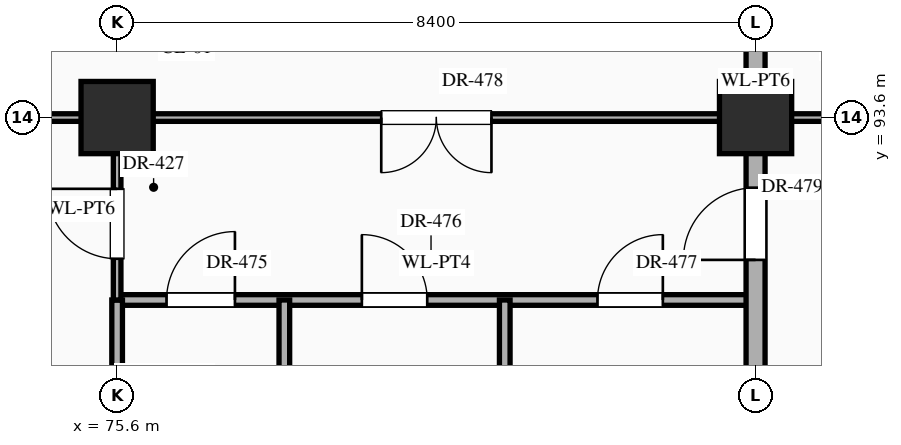
"""IFC4 building model, lengths in metres.
Left out: names, types, materials, properties, quantities, classifications, styles, units other than length and angle.
Written with IfcOpenShell. Run it as: python <this file> out.ifc"""

import sys

from ifc_helpers import new_model, si_unit, direction, frame, frame_2d, origin, origin_2d, place, context, subcontext, project, spatial, rectangle, extrude, element, fill, save


model = new_model("IFC4")
c1 = context("Model", 3, precision=1e-05, world=origin(), true_north=direction((0.0, 1.0)))
c2 = subcontext(c1, "Body", "Model", "MODEL_VIEW")
j1 = project(units=[si_unit("LENGTHUNIT", "METRE"), si_unit("PLANEANGLEUNIT", "RADIAN")], contexts=[c1])
p1 = place(None, origin())
s1 = spatial("IfcSite", under=j1, at=p1, CompositionType="ELEMENT")
p2 = place(p1, origin())
s2 = spatial("IfcBuilding", under=s1, at=p2, CompositionType="ELEMENT")
p3 = place(p2, frame((0.0, 0.0, -5.4)))
s3 = spatial("IfcBuildingStorey", under=s2, at=p3, CompositionType="ELEMENT", Elevation=-5.4)
for number, where, z_axis, x_axis in (
    (1, (75.6, 93.6, 0.0), (0.0, 0.0, 1.0), (1.0, 0.0, 0.0)),
    (2, (84.0, 93.6, 0.0), (0.0, 0.0, 1.0), (1.0, 0.0, 0.0)),
):
    element("IfcColumn", number, at=place(p3, frame(where, z_axis=z_axis, x_axis=x_axis)), inside=s3, PredefinedType="COLUMN", context=c2, shape_type="SweptSolid", body=[
        extrude(rectangle(XDim=0.95, YDim=0.95, at=origin_2d()), origin(), (0.0, 0.0, 1.0), 5.4),
    ])
p4 = place(p3, frame((75.6, 91.2, 0.0), z_axis=(0.0, 0.0, 1.0), x_axis=(1.0, 0.0, 0.0)))
e3 = element("IfcWall", 3, at=p4, inside=s3, PredefinedType="STANDARD", context=c2, shape_type="SweptSolid", body=[
    extrude(rectangle(XDim=8.4, YDim=0.14, at=frame_2d((4.2, 0.0))), origin(), (0.0, 0.0, 1.0), 5.1),
])
p5 = place(p4, frame((0.65, 0.0, 0.0)))
e4 = element("IfcOpeningElement", 4, at=p5, cuts=e3, PredefinedType="OPENING", context=c2, shape_type="SweptSolid", body=[
    extrude(rectangle(XDim=0.9, YDim=2.15, at=frame_2d((0.45, 1.075))), frame((0.0, 0.082, 0.0), z_axis=(0.0, -1.0, 0.0), x_axis=(1.0, 0.0, 0.0)), (0.0, 0.0, 1.0), 0.164),
])
p6 = place(p4, frame((3.22, 0.0, 0.0)))
e5 = element("IfcOpeningElement", 5, at=p6, cuts=e3, PredefinedType="OPENING", context=c2, shape_type="SweptSolid", body=[
    extrude(rectangle(XDim=0.86, YDim=2.1, at=frame_2d((0.43, 1.05))), frame((0.0, 0.082, 0.0), z_axis=(0.0, -1.0, 0.0), x_axis=(1.0, 0.0, 0.0)), (0.0, 0.0, 1.0), 0.164),
])
p7 = place(p4, frame((6.32, 0.0, 0.0)))
e6 = element("IfcOpeningElement", 6, at=p7, cuts=e3, PredefinedType="OPENING", context=c2, shape_type="SweptSolid", body=[
    extrude(rectangle(XDim=0.86, YDim=2.1, at=frame_2d((0.43, 1.05))), frame((0.0, 0.082, 0.0), z_axis=(0.0, -1.0, 0.0), x_axis=(1.0, 0.0, 0.0)), (0.0, 0.0, 1.0), 0.164),
])
p8 = place(p3, frame((67.2, 93.6, 0.0), z_axis=(0.0, 0.0, 1.0), x_axis=(1.0, 0.0, 0.0)))
e7 = element("IfcWall", 7, at=p8, inside=s3, PredefinedType="STANDARD", context=c2, shape_type="SweptSolid", body=[
    extrude(rectangle(XDim=33.6, YDim=0.1, at=frame_2d((16.8, 0.0))), origin(), (0.0, 0.0, 1.0), 4.25),
])
p9 = place(p8, frame((3.425, 0.0, 0.0)))
e8 = element("IfcOpeningElement", 8, at=p9, cuts=e7, PredefinedType="OPENING", context=c2, shape_type="SweptSolid", body=[
    extrude(rectangle(XDim=1.55, YDim=2.35, at=frame_2d((0.775, 1.175))), frame((0.0, 0.062, 0.0), z_axis=(0.0, -1.0, 0.0), x_axis=(1.0, 0.0, 0.0)), (0.0, 0.0, 1.0), 0.124),
])
p10 = place(p8, frame((28.55, 0.0, 0.0)))
e9 = element("IfcOpeningElement", 9, at=p10, cuts=e7, PredefinedType="OPENING", context=c2, shape_type="SweptSolid", body=[
    extrude(rectangle(XDim=1.7, YDim=2.45, at=frame_2d((0.85, 1.225))), frame((0.0, 0.062, 0.0), z_axis=(0.0, -1.0, 0.0), x_axis=(1.0, 0.0, 0.0)), (0.0, 0.0, 1.0), 0.124),
])
p11 = place(p8, frame((11.875, 0.0, 0.0)))
e10 = element("IfcOpeningElement", 10, at=p11, cuts=e7, PredefinedType="OPENING", context=c2, shape_type="SweptSolid", body=[
    extrude(rectangle(XDim=1.45, YDim=2.3, at=frame_2d((0.725, 1.15))), frame((0.0, 0.062, 0.0), z_axis=(0.0, -1.0, 0.0), x_axis=(1.0, 0.0, 0.0)), (0.0, 0.0, 1.0), 0.124),
])
p12 = place(p8, frame((17.857, 0.0, 0.0)))
e11 = element("IfcOpeningElement", 11, at=p12, cuts=e7, PredefinedType="OPENING", context=c2, shape_type="SweptSolid", body=[
    extrude(rectangle(XDim=1.08, YDim=2.25, at=frame_2d((0.54, 1.125))), frame((0.0, 0.062, 0.0), z_axis=(0.0, -1.0, 0.0), x_axis=(1.0, 0.0, 0.0)), (0.0, 0.0, 1.0), 0.124),
])
p13 = place(p8, frame((20.44, 0.0, 0.0)))
e12 = element("IfcOpeningElement", 12, at=p13, cuts=e7, PredefinedType="OPENING", context=c2, shape_type="SweptSolid", body=[
    extrude(rectangle(XDim=1.12, YDim=2.25, at=frame_2d((0.56, 1.125))), frame((0.0, 0.062, 0.0), z_axis=(0.0, -1.0, 0.0), x_axis=(1.0, 0.0, 0.0)), (0.0, 0.0, 1.0), 0.124),
])
p14 = place(p8, frame((23.022, 0.0, 0.0)))
e13 = element("IfcOpeningElement", 13, at=p14, cuts=e7, PredefinedType="OPENING", context=c2, shape_type="SweptSolid", body=[
    extrude(rectangle(XDim=1.16, YDim=2.3, at=frame_2d((0.58, 1.15))), frame((0.0, 0.062, 0.0), z_axis=(0.0, -1.0, 0.0), x_axis=(1.0, 0.0, 0.0)), (0.0, 0.0, 1.0), 0.124),
])
p15 = place(p3, frame((75.6, 89.2, 0.0), z_axis=(0.0, 0.0, 1.0), x_axis=(0.0, 1.0, 0.0)))
e14 = element("IfcWall", 14, at=p15, inside=s3, PredefinedType="STANDARD", context=c2, shape_type="SweptSolid", body=[
    extrude(rectangle(XDim=2.0, YDim=0.14, at=frame_2d((1.0, 0.0))), origin(), (0.0, 0.0, 1.0), 4.35),
])
p16 = place(p3, frame((75.6, 91.2, 0.0), z_axis=(0.0, 0.0, 1.0), x_axis=(0.0, 1.0, 0.0)))
e15 = element("IfcWall", 15, at=p16, inside=s3, PredefinedType="STANDARD", context=c2, shape_type="SweptSolid", body=[
    extrude(rectangle(XDim=2.4, YDim=0.1, at=frame_2d((1.2, 0.0))), origin(), (0.0, 0.0, 1.0), 4.35),
])
p17 = place(p16, frame((0.542, 0.0, 0.0)))
e16 = element("IfcOpeningElement", 16, at=p17, cuts=e15, PredefinedType="OPENING", context=c2, shape_type="SweptSolid", body=[
    extrude(rectangle(XDim=0.92, YDim=2.15, at=frame_2d((0.46, 1.075))), frame((0.0, 0.062, 0.0), z_axis=(0.0, -1.0, 0.0), x_axis=(1.0, 0.0, 0.0)), (0.0, 0.0, 1.0), 0.124),
])
for number, where, z_axis, x_axis in (
    (17, (77.8, 86.4, 0.0), (0.0, 0.0, 1.0), (0.0, 1.0, 0.0)),
    (18, (80.7, 86.4, 0.0), (0.0, 0.0, 1.0), (0.0, 1.0, 0.0)),
):
    element("IfcWall", number, at=place(p3, frame(where, z_axis=z_axis, x_axis=x_axis)), inside=s3, PredefinedType="STANDARD", context=c2, shape_type="SweptSolid", body=[
        extrude(rectangle(XDim=4.8, YDim=0.14, at=frame_2d((2.4, 0.0))), origin(), (0.0, 0.0, 1.0), 5.1),
    ])
p18 = place(p3, frame((84.0, 79.2, 0.0), z_axis=(0.0, 0.0, 1.0), x_axis=(0.0, 1.0, 0.0)))
e19 = element("IfcWall", 19, at=p18, inside=s3, PredefinedType="STANDARD", context=c2, shape_type="SweptSolid", body=[
    extrude(rectangle(XDim=35.96, YDim=0.25, at=frame_2d((17.98, 0.0))), origin(), (0.0, 0.0, 1.0), 4.35),
])
p19 = place(p18, frame((22.798, 0.0, 0.0)))
e20 = element("IfcOpeningElement", 20, at=p19, cuts=e19, PredefinedType="OPENING", context=c2, shape_type="SweptSolid", body=[
    extrude(rectangle(XDim=1.6, YDim=2.3, at=frame_2d((0.8, 1.15))), frame((0.0, 0.137, 0.0), z_axis=(0.0, -1.0, 0.0), x_axis=(1.0, 0.0, 0.0)), (0.0, 0.0, 1.0), 0.274),
])
p20 = place(p18, frame((12.528, 0.0, 0.0)))
e21 = element("IfcOpeningElement", 21, at=p20, cuts=e19, PredefinedType="OPENING", context=c2, shape_type="SweptSolid", body=[
    extrude(rectangle(XDim=0.95, YDim=2.15, at=frame_2d((0.475, 1.075))), frame((0.0, 0.137, 0.0), z_axis=(0.0, -1.0, 0.0), x_axis=(1.0, 0.0, 0.0)), (0.0, 0.0, 1.0), 0.274),
])
p21 = place(p18, frame((15.323, 0.0, 0.0)))
e22 = element("IfcOpeningElement", 22, at=p21, cuts=e19, PredefinedType="OPENING", context=c2, shape_type="SweptSolid", body=[
    extrude(rectangle(XDim=0.95, YDim=2.15, at=frame_2d((0.475, 1.075))), frame((0.0, 0.137, 0.0), z_axis=(0.0, -1.0, 0.0), x_axis=(1.0, 0.0, 0.0)), (0.0, 0.0, 1.0), 0.274),
])
p22 = place(p18, frame((25.903, 0.0, 0.0)))
e23 = element("IfcOpeningElement", 23, at=p22, cuts=e19, PredefinedType="OPENING", context=c2, shape_type="SweptSolid", body=[
    extrude(rectangle(XDim=1.8, YDim=2.35, at=frame_2d((0.9, 1.175))), frame((0.0, 0.137, 0.0), z_axis=(0.0, -1.0, 0.0), x_axis=(1.0, 0.0, 0.0)), (0.0, 0.0, 1.0), 0.274),
])
p23 = place(p18, frame((29.722, 0.0, 0.0)))
e24 = element("IfcOpeningElement", 24, at=p23, cuts=e19, PredefinedType="OPENING", context=c2, shape_type="SweptSolid", body=[
    extrude(rectangle(XDim=0.95, YDim=2.15, at=frame_2d((0.475, 1.075))), frame((0.0, 0.137, 0.0), z_axis=(0.0, -1.0, 0.0), x_axis=(1.0, 0.0, 0.0)), (0.0, 0.0, 1.0), 0.274),
])
p24 = place(p18, frame((5.327, 0.0, 0.0)))
e25 = element("IfcOpeningElement", 25, at=p24, cuts=e19, PredefinedType="OPENING", context=c2, shape_type="SweptSolid", body=[
    extrude(rectangle(XDim=0.95, YDim=2.15, at=frame_2d((0.475, 1.075))), frame((0.0, 0.137, 0.0), z_axis=(0.0, -1.0, 0.0), x_axis=(1.0, 0.0, 0.0)), (0.0, 0.0, 1.0), 0.274),
])
p25 = place(p17, origin())
e26 = element("IfcDoor", 26, at=p25, inside=s3, OperationType="SINGLE_SWING_RIGHT", PredefinedType="DOOR", context=c2, shape_type="SweptSolid", body=[
    extrude(rectangle(XDim=0.92, YDim=2.15, at=frame_2d((0.46, 1.075))), frame((0.0, 0.025, 0.0), z_axis=(0.0, -1.0, 0.0), x_axis=(1.0, 0.0, 0.0)), (0.0, 0.0, 1.0), 0.05),
])
fill(e16, e26)
p26 = place(p5, origin())
e27 = element("IfcDoor", 27, at=p26, inside=s3, OperationType="SINGLE_SWING_RIGHT", PredefinedType="DOOR", context=c2, shape_type="SweptSolid", body=[
    extrude(rectangle(XDim=0.9, YDim=2.15, at=frame_2d((0.45, 1.075))), frame((0.0, 0.025, 0.0), z_axis=(0.0, -1.0, 0.0), x_axis=(1.0, 0.0, 0.0)), (0.0, 0.0, 1.0), 0.05),
])
fill(e4, e27)
p27 = place(p6, origin())
e28 = element("IfcDoor", 28, at=p27, inside=s3, OperationType="SINGLE_SWING_LEFT", PredefinedType="DOOR", context=c2, shape_type="SweptSolid", body=[
    extrude(rectangle(XDim=0.86, YDim=2.1, at=frame_2d((0.43, 1.05))), frame((0.0, 0.025, 0.0), z_axis=(0.0, -1.0, 0.0), x_axis=(1.0, 0.0, 0.0)), (0.0, 0.0, 1.0), 0.05),
])
fill(e5, e28)
p28 = place(p7, origin())
e29 = element("IfcDoor", 29, at=p28, inside=s3, OperationType="SINGLE_SWING_RIGHT", PredefinedType="DOOR", context=c2, shape_type="SweptSolid", body=[
    extrude(rectangle(XDim=0.86, YDim=2.1, at=frame_2d((0.43, 1.05))), frame((0.0, 0.025, 0.0), z_axis=(0.0, -1.0, 0.0), x_axis=(1.0, 0.0, 0.0)), (0.0, 0.0, 1.0), 0.05),
])
fill(e6, e29)
p29 = place(p11, frame((1.45, 0.0, 0.0), z_axis=(0.0, 0.0, 1.0), x_axis=(-1.0, 0.0, 0.0)))
e30 = element("IfcDoor", 30, at=p29, inside=s3, OperationType="DOUBLE_DOOR_SINGLE_SWING", PredefinedType="DOOR", context=c2, shape_type="SweptSolid", body=[
    extrude(rectangle(XDim=1.45, YDim=2.3, at=frame_2d((0.725, 1.15))), frame((0.0, 0.025, 0.0), z_axis=(0.0, -1.0, 0.0), x_axis=(1.0, 0.0, 0.0)), (0.0, 0.0, 1.0), 0.05),
])
fill(e10, e30)
p30 = place(p20, origin())
e31 = element("IfcDoor", 31, at=p30, inside=s3, OperationType="SINGLE_SWING_LEFT", PredefinedType="DOOR", context=c2, shape_type="SweptSolid", body=[
    extrude(rectangle(XDim=0.95, YDim=2.15, at=frame_2d((0.475, 1.075))), frame((0.0, 0.025, 0.0), z_axis=(0.0, -1.0, 0.0), x_axis=(1.0, 0.0, 0.0)), (0.0, 0.0, 1.0), 0.05),
])
fill(e21, e31)
save(model, sys.argv[1])
